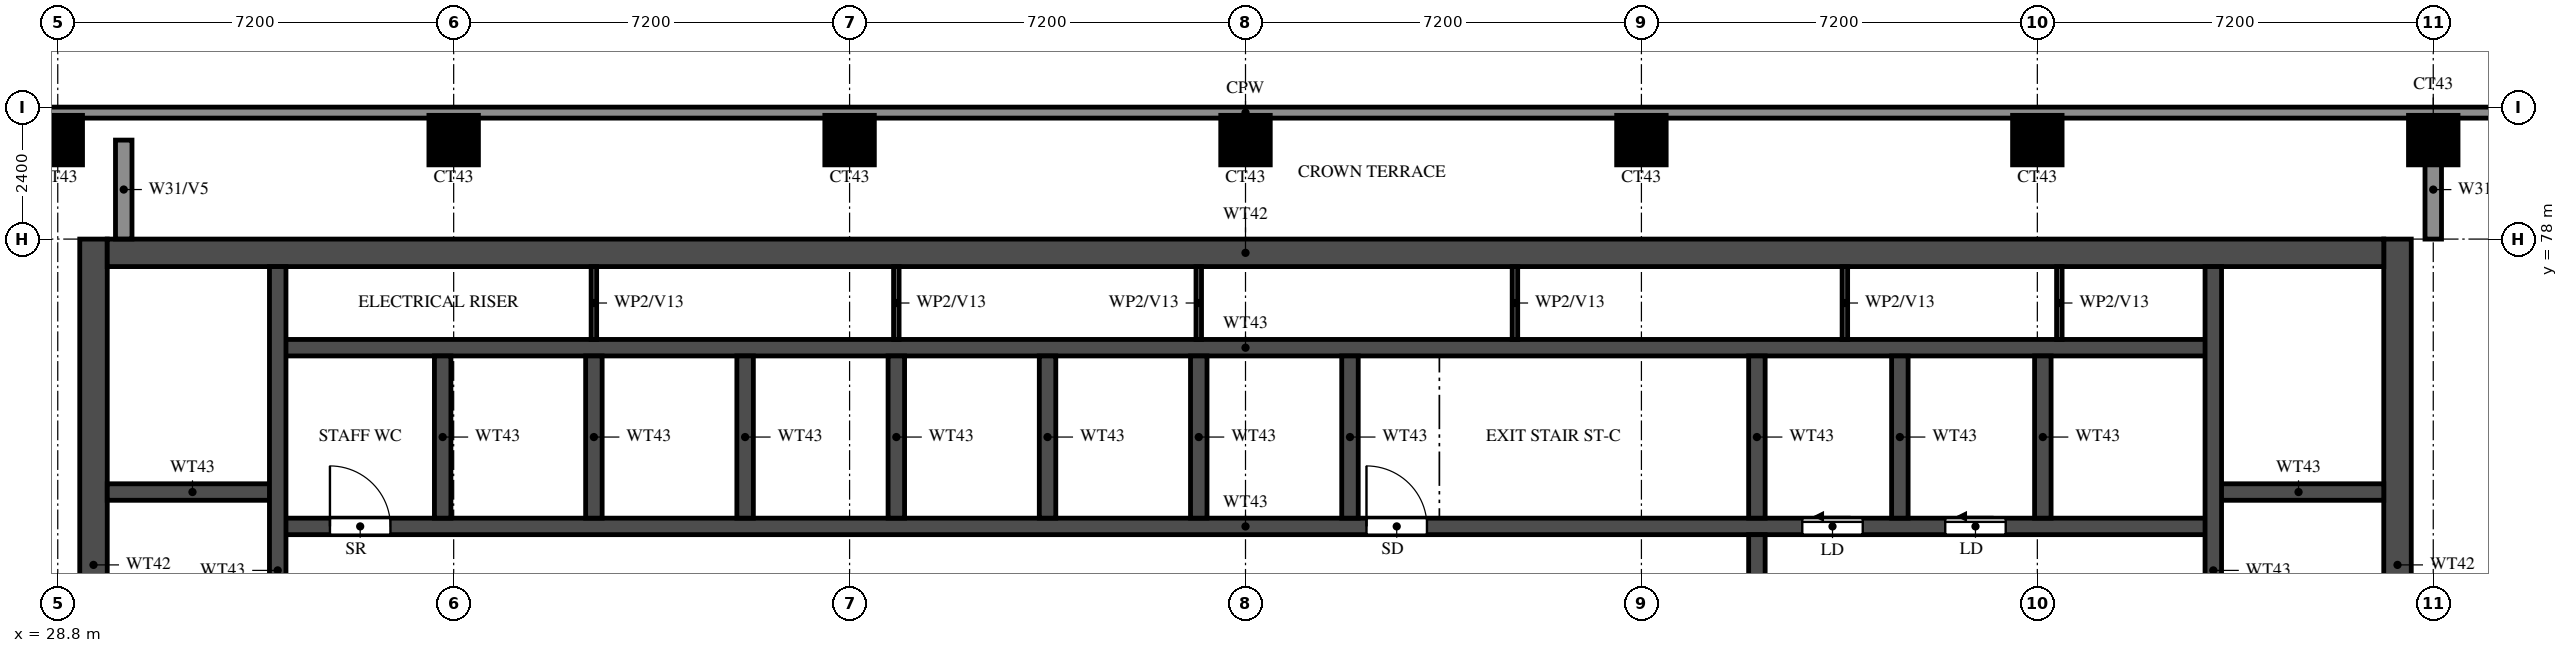
"""IFC4 building model, lengths in metres.
Left out: names, types, materials, properties, quantities, classifications, styles, units other than length and angle.
Written with IfcOpenShell. Run it as: python <this file> out.ifc"""

import sys

from ifc_helpers import new_model, si_unit, direction, frame, frame_2d, origin, origin_2d, place, context, subcontext, project, spatial, rectangle, extrude, source, transform, mapped, element, fill, save


model = new_model("IFC4")
c1 = context("Model", 3, precision=1e-05, world=origin(), true_north=direction((0.0, 1.0)))
c2 = subcontext(c1, "Body", "Model", "MODEL_VIEW")
j1 = project(units=[si_unit("LENGTHUNIT", "METRE"), si_unit("PLANEANGLEUNIT", "RADIAN")], contexts=[c1])
p1 = place(None, origin())
s1 = spatial("IfcSite", under=j1, at=p1, CompositionType="ELEMENT")
p2 = place(p1, origin())
s2 = spatial("IfcBuilding", under=s1, at=p2, CompositionType="ELEMENT")
p3 = place(p2, frame((0.0, 0.0, 274.5)))
s3 = spatial("IfcBuildingStorey", under=s2, at=p3, CompositionType="ELEMENT", Elevation=274.5)
m1 = source(origin(), c2, "Body", "SweptSolid", [
    extrude(rectangle(XDim=0.9, YDim=0.9, at=origin_2d()), origin(), (0.0, 0.0, 1.0), 7.0),
])
for number, where, z_axis, x_axis in (
    (1, (28.8, 79.8, 0.0), (0.0, 0.0, 1.0), (1.0, 0.0, 0.0)),
    (2, (36.0, 79.8, 0.0), (0.0, 0.0, 1.0), (1.0, 0.0, 0.0)),
    (3, (43.2, 79.8, 0.0), (0.0, 0.0, 1.0), (1.0, 0.0, 0.0)),
    (4, (50.4, 79.8, 0.0), (0.0, 0.0, 1.0), (1.0, 0.0, 0.0)),
    (5, (57.6, 79.8, 0.0), (0.0, 0.0, 1.0), (1.0, 0.0, 0.0)),
    (6, (64.8, 79.8, 0.0), (0.0, 0.0, 1.0), (1.0, 0.0, 0.0)),
    (7, (72.0, 79.8, 0.0), (0.0, 0.0, 1.0), (1.0, 0.0, 0.0)),
):
    element("IfcColumn", number, at=place(p3, frame(where, z_axis=z_axis, x_axis=x_axis)), inside=s3, PredefinedType="COLUMN", context=c2, shape_type="MappedRepresentation", body=[
        mapped(m1, transform((0.0, 0.0, 0.0))),
    ])
for number, where, z_axis, x_axis in (
    (8, (29.45, 66.15, 0.0), (0.0, 0.0, 1.0), (0.0, 1.0, 0.0)),
    (9, (71.35, 66.15, 0.0), (0.0, 0.0, 1.0), (0.0, 1.0, 0.0)),
):
    element("IfcWall", number, at=place(p3, frame(where, z_axis=z_axis, x_axis=x_axis)), inside=s3, PredefinedType="SHEAR", context=c2, shape_type="SweptSolid", body=[
        extrude(rectangle(XDim=11.85, YDim=0.5, at=frame_2d((5.925, 0.0))), origin(), (0.0, 0.0, 1.0), 7.0),
    ])
p4 = place(p3, frame((29.7, 77.75, 0.0), z_axis=(0.0, 0.0, 1.0), x_axis=(1.0, 0.0, 0.0)))
e10 = element("IfcWall", 10, at=p4, inside=s3, PredefinedType="SHEAR", context=c2, shape_type="SweptSolid", body=[
    extrude(rectangle(XDim=41.4, YDim=0.5, at=frame_2d((20.7, 0.0))), origin(), (0.0, 0.0, 1.0), 7.0),
])
p5 = place(p3, frame((32.8, 72.775, 0.0), z_axis=(0.0, 0.0, 1.0), x_axis=(1.0, 0.0, 0.0)))
e11 = element("IfcWall", 11, at=p5, inside=s3, PredefinedType="SHEAR", context=c2, shape_type="SweptSolid", body=[
    extrude(rectangle(XDim=35.2, YDim=0.3, at=frame_2d((17.6, 0.0))), origin(), (0.0, 0.0, 1.0), 7.0),
])
p6 = place(p5, frame((19.8, 0.0, 0.0)))
e12 = element("IfcOpeningElement", 12, at=p6, cuts=e11, PredefinedType="OPENING", context=c2, shape_type="SweptSolid", body=[
    extrude(rectangle(XDim=1.1, YDim=2.1, at=frame_2d((0.55, 1.05))), frame((0.0, 0.16, 0.0), z_axis=(0.0, -1.0, 0.0), x_axis=(1.0, 0.0, 0.0)), (0.0, 0.0, 1.0), 0.32),
])
p7 = place(p5, frame((27.725, 0.0, 0.0)))
e13 = element("IfcOpeningElement", 13, at=p7, cuts=e11, PredefinedType="OPENING", context=c2, shape_type="SweptSolid", body=[
    extrude(rectangle(XDim=1.1, YDim=2.1, at=frame_2d((0.55, 1.05))), frame((0.0, 0.16, 0.0), z_axis=(0.0, -1.0, 0.0), x_axis=(1.0, 0.0, 0.0)), (0.0, 0.0, 1.0), 0.32),
])
p8 = place(p5, frame((30.325, 0.0, 0.0)))
e14 = element("IfcOpeningElement", 14, at=p8, cuts=e11, PredefinedType="OPENING", context=c2, shape_type="SweptSolid", body=[
    extrude(rectangle(XDim=1.1, YDim=2.1, at=frame_2d((0.55, 1.05))), frame((0.0, 0.16, 0.0), z_axis=(0.0, -1.0, 0.0), x_axis=(1.0, 0.0, 0.0)), (0.0, 0.0, 1.0), 0.32),
])
p9 = place(p5, frame((0.95, 0.0, 0.0)))
e15 = element("IfcOpeningElement", 15, at=p9, cuts=e11, PredefinedType="OPENING", context=c2, shape_type="SweptSolid", body=[
    extrude(rectangle(XDim=1.1, YDim=2.1, at=frame_2d((0.55, 1.05))), frame((0.0, 0.16, 0.0), z_axis=(0.0, -1.0, 0.0), x_axis=(1.0, 0.0, 0.0)), (0.0, 0.0, 1.0), 0.32),
])
p10 = place(p3, frame((32.8, 76.025, 0.0), z_axis=(0.0, 0.0, 1.0), x_axis=(1.0, 0.0, 0.0)))
e16 = element("IfcWall", 16, at=p10, inside=s3, PredefinedType="SHEAR", context=c2, shape_type="SweptSolid", body=[
    extrude(rectangle(XDim=35.2, YDim=0.3, at=frame_2d((17.6, 0.0))), origin(), (0.0, 0.0, 1.0), 7.0),
])
for number, where, z_axis, x_axis in (
    (17, (29.7, 73.4, 0.0), (0.0, 0.0, 1.0), (1.0, 0.0, 0.0)),
    (18, (68.0, 73.4, 0.0), (0.0, 0.0, 1.0), (1.0, 0.0, 0.0)),
):
    element("IfcWall", number, at=place(p3, frame(where, z_axis=z_axis, x_axis=x_axis)), inside=s3, PredefinedType="SHEAR", context=c2, shape_type="SweptSolid", body=[
        extrude(rectangle(XDim=3.1, YDim=0.3, at=frame_2d((1.55, 0.0))), origin(), (0.0, 0.0, 1.0), 7.0),
    ])
p11 = place(p3, frame((32.8, 66.45, 0.0), z_axis=(0.0, 0.0, 1.0), x_axis=(0.0, 1.0, 0.0)))
e19 = element("IfcWall", 19, at=p11, inside=s3, PredefinedType="SHEAR", context=c2, shape_type="SweptSolid", body=[
    extrude(rectangle(XDim=11.05, YDim=0.3, at=frame_2d((5.525, 0.0))), origin(), (0.0, 0.0, 1.0), 7.0),
])
p12 = place(p3, frame((68.0, 66.45, 0.0), z_axis=(0.0, 0.0, 1.0), x_axis=(0.0, 1.0, 0.0)))
e20 = element("IfcWall", 20, at=p12, inside=s3, PredefinedType="SHEAR", context=c2, shape_type="SweptSolid", body=[
    extrude(rectangle(XDim=11.05, YDim=0.3, at=frame_2d((5.525, 0.0))), origin(), (0.0, 0.0, 1.0), 7.0),
])
p13 = place(p12, frame((0.15, 0.0, 0.0)))
e21 = element("IfcOpeningElement", 21, at=p13, cuts=e20, PredefinedType="OPENING", context=c2, shape_type="SweptSolid", body=[
    extrude(rectangle(XDim=1.1, YDim=2.1, at=frame_2d((0.55, 1.05))), frame((0.0, 0.16, 0.0), z_axis=(0.0, -1.0, 0.0), x_axis=(1.0, 0.0, 0.0)), (0.0, 0.0, 1.0), 0.32),
])
p14 = place(p3, frame((59.7, 66.45, 0.0), z_axis=(0.0, 0.0, 1.0), x_axis=(0.0, 1.0, 0.0)))
e22 = element("IfcWall", 22, at=p14, inside=s3, PredefinedType="SHEAR", context=c2, shape_type="SweptSolid", body=[
    extrude(rectangle(XDim=6.175, YDim=0.3, at=frame_2d((3.087, 0.0))), origin(), (0.0, 0.0, 1.0), 7.0),
])
p15 = place(p14, frame((3.85, 0.0, 0.0)))
e23 = element("IfcOpeningElement", 23, at=p15, cuts=e22, PredefinedType="OPENING", context=c2, shape_type="SweptSolid", body=[
    extrude(rectangle(XDim=1.2, YDim=2.1, at=frame_2d((0.6, 1.05))), frame((0.0, 0.16, 0.0), z_axis=(0.0, -1.0, 0.0), x_axis=(1.0, 0.0, 0.0)), (0.0, 0.0, 1.0), 0.32),
])
for number, where, z_axis, x_axis in (
    (24, (59.7, 72.925, 0.0), (0.0, 0.0, 1.0), (0.0, 1.0, 0.0)),
    (25, (35.8, 72.925, 0.0), (0.0, 0.0, 1.0), (0.0, 1.0, 0.0)),
    (26, (38.55, 72.925, 0.0), (0.0, 0.0, 1.0), (0.0, 1.0, 0.0)),
    (27, (41.3, 72.925, 0.0), (0.0, 0.0, 1.0), (0.0, 1.0, 0.0)),
    (28, (44.05, 72.925, 0.0), (0.0, 0.0, 1.0), (0.0, 1.0, 0.0)),
    (29, (46.8, 72.925, 0.0), (0.0, 0.0, 1.0), (0.0, 1.0, 0.0)),
    (30, (49.55, 72.925, 0.0), (0.0, 0.0, 1.0), (0.0, 1.0, 0.0)),
    (31, (52.3, 72.925, 0.0), (0.0, 0.0, 1.0), (0.0, 1.0, 0.0)),
    (32, (62.3, 72.925, 0.0), (0.0, 0.0, 1.0), (0.0, 1.0, 0.0)),
    (33, (64.9, 72.925, 0.0), (0.0, 0.0, 1.0), (0.0, 1.0, 0.0)),
):
    element("IfcWall", number, at=place(p3, frame(where, z_axis=z_axis, x_axis=x_axis)), inside=s3, PredefinedType="SHEAR", context=c2, shape_type="SweptSolid", body=[
        extrude(rectangle(XDim=2.95, YDim=0.3, at=frame_2d((1.475, 0.0))), origin(), (0.0, 0.0, 1.0), 7.0),
    ])
p16 = place(p3, frame((78.8, 80.3, 0.0), z_axis=(0.0, 0.0, 1.0), x_axis=(-1.0, 0.0, 0.0)))
e34 = element("IfcWall", 34, at=p16, inside=s3, PredefinedType="SOLIDWALL", context=c2, shape_type="SweptSolid", body=[
    extrude(rectangle(XDim=56.8, YDim=0.2, at=frame_2d((28.4, 0.0))), origin(), (0.0, 0.0, 1.0), 7.0),
])
for number, where, z_axis, x_axis in (
    (35, (38.55, 76.175, 0.0), (0.0, 0.0, 1.0), (0.0, 1.0, 0.0)),
    (36, (44.05, 76.175, 0.0), (0.0, 0.0, 1.0), (0.0, 1.0, 0.0)),
    (37, (49.55, 76.175, 0.0), (0.0, 0.0, 1.0), (0.0, 1.0, 0.0)),
    (38, (55.3, 76.175, 0.0), (0.0, 0.0, 1.0), (0.0, 1.0, 0.0)),
    (39, (61.3, 76.175, 0.0), (0.0, 0.0, 1.0), (0.0, 1.0, 0.0)),
    (40, (65.2, 76.175, 0.0), (0.0, 0.0, 1.0), (0.0, 1.0, 0.0)),
):
    element("IfcWall", number, at=place(p3, frame(where, z_axis=z_axis, x_axis=x_axis)), inside=s3, PredefinedType="PARTITIONING", context=c2, shape_type="SweptSolid", body=[
        extrude(rectangle(XDim=1.325, YDim=0.1, at=frame_2d((0.663, 0.0))), origin(), (0.0, 0.0, 1.0), 7.0),
    ])
p17 = place(p3, frame((30.0, 78.002, 0.0), z_axis=(0.0, 0.0, 1.0), x_axis=(0.0, 1.0, 0.0)))
e41 = element("IfcWall", 41, at=p17, inside=s3, PredefinedType="SOLIDWALL", context=c2, shape_type="SweptSolid", body=[
    extrude(rectangle(XDim=1.798, YDim=0.3, at=frame_2d((0.899, 0.0))), origin(), (0.0, 0.0, 1.0), 7.0),
])
p18 = place(p3, frame((72.0, 78.0, 0.0), z_axis=(0.0, 0.0, 1.0), x_axis=(0.0, 1.0, 0.0)))
e42 = element("IfcWall", 42, at=p18, inside=s3, PredefinedType="SOLIDWALL", context=c2, shape_type="SweptSolid", body=[
    extrude(rectangle(XDim=1.8, YDim=0.3, at=frame_2d((0.9, 0.0))), origin(), (0.0, 0.0, 1.0), 7.0),
])
p19 = place(p6, origin())
e43 = element("IfcDoor", 43, at=p19, inside=s3, OperationType="SINGLE_SWING_LEFT", PredefinedType="DOOR", context=c2, shape_type="SweptSolid", body=[
    extrude(rectangle(XDim=1.1, YDim=2.1, at=frame_2d((0.55, 1.05))), frame((0.0, 0.025, 0.0), z_axis=(0.0, -1.0, 0.0), x_axis=(1.0, 0.0, 0.0)), (0.0, 0.0, 1.0), 0.05),
])
fill(e12, e43)
p20 = place(p7, origin())
e44 = element("IfcDoor", 44, at=p20, inside=s3, OperationType="SLIDING_TO_LEFT", PredefinedType="DOOR", context=c2, shape_type="SweptSolid", body=[
    extrude(rectangle(XDim=1.1, YDim=2.1, at=frame_2d((0.55, 1.05))), frame((0.0, 0.025, 0.0), z_axis=(0.0, -1.0, 0.0), x_axis=(1.0, 0.0, 0.0)), (0.0, 0.0, 1.0), 0.05),
])
fill(e13, e44)
p21 = place(p8, origin())
e45 = element("IfcDoor", 45, at=p21, inside=s3, OperationType="SLIDING_TO_LEFT", PredefinedType="DOOR", context=c2, shape_type="SweptSolid", body=[
    extrude(rectangle(XDim=1.1, YDim=2.1, at=frame_2d((0.55, 1.05))), frame((0.0, 0.025, 0.0), z_axis=(0.0, -1.0, 0.0), x_axis=(1.0, 0.0, 0.0)), (0.0, 0.0, 1.0), 0.05),
])
fill(e14, e45)
p22 = place(p9, origin())
e46 = element("IfcDoor", 46, at=p22, inside=s3, OperationType="SINGLE_SWING_LEFT", PredefinedType="DOOR", context=c2, shape_type="SweptSolid", body=[
    extrude(rectangle(XDim=1.1, YDim=2.1, at=frame_2d((0.55, 1.05))), frame((0.0, 0.025, 0.0), z_axis=(0.0, -1.0, 0.0), x_axis=(1.0, 0.0, 0.0)), (0.0, 0.0, 1.0), 0.05),
])
fill(e15, e46)
save(model, sys.argv[1])
